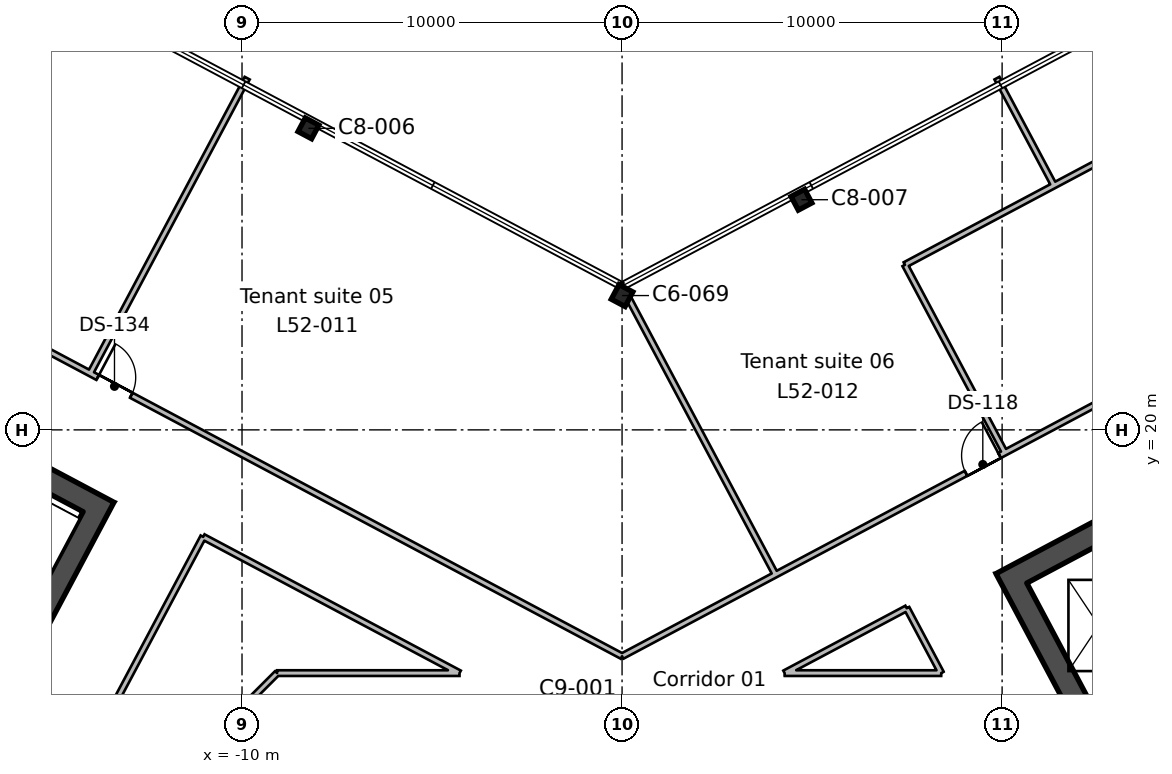
"""IFC4 building model, lengths in metres.
Left out: names, types, materials, properties, quantities, classifications, styles, units other than length and angle.
Written with IfcOpenShell. Run it as: python <this file> out.ifc"""

import sys

from ifc_helpers import new_model, si_unit, direction, frame, frame_2d, origin, origin_2d, place, context, subcontext, project, spatial, rectangle, i_section, extrude, element, fill, save


model = new_model("IFC4")
c1 = context("Model", 3, precision=1e-05, world=origin(), true_north=direction((0.0, 1.0)))
c2 = subcontext(c1, "Body", "Model", "MODEL_VIEW")
j1 = project(units=[si_unit("LENGTHUNIT", "METRE"), si_unit("PLANEANGLEUNIT", "RADIAN")], contexts=[c1])
p1 = place(None, origin())
s1 = spatial("IfcSite", under=j1, at=p1, CompositionType="ELEMENT")
p2 = place(p1, origin())
s2 = spatial("IfcBuilding", under=s1, at=p2, CompositionType="ELEMENT")
p3 = place(p2, frame((0.0, 0.0, 236.4)))
s3 = spatial("IfcBuildingStorey", under=s2, at=p3, CompositionType="ELEMENT", Elevation=236.4)
p4 = place(p3, frame((0.0, 23.534, 0.0), z_axis=(0.0, 0.0, 1.0), x_axis=(-0.882947592859, 0.469471562786, 0.0)))
e1 = element("IfcColumn", 1, at=p4, inside=s3, PredefinedType="COLUMN", context=c2, shape_type="SweptSolid", body=[
    extrude(i_section(OverallWidth=0.412, OverallDepth=0.434, WebThickness=0.036, FlangeThickness=0.057, FilletRadius=0.015, at=origin_2d()), origin(), (0.0, 0.0, 1.0), 3.9),
])
for number, where, z_axis, x_axis in (
    (2, (4.72, 26.056, 0.0), (0.0, 0.0, 1.0), (-0.883, -0.469, 0.0)),
    (3, (-8.252, 27.934, 0.0), (0.0, 0.0, 1.0), (-0.883, 0.469, 0.0)),
):
    element("IfcColumn", number, at=place(p3, frame(where, z_axis=z_axis, x_axis=x_axis)), inside=s3, PredefinedType="COLUMN", context=c2, shape_type="SweptSolid", body=[
        extrude(i_section(OverallWidth=0.404, OverallDepth=0.406, WebThickness=0.027, FlangeThickness=0.044, FilletRadius=0.015, at=origin_2d()), origin(), (0.0, 0.0, 1.0), 3.9),
    ])
p5 = place(p3, frame((-13.635, 18.236, 0.0), z_axis=(0.0, 0.0, 1.0), x_axis=(-0.469478769487, -0.88294376095, 0.0)))
e4 = element("IfcWall", 4, at=p5, inside=s3, PredefinedType="SHEAR", context=c2, shape_type="SweptSolid", body=[
    extrude(rectangle(XDim=19.4, YDim=0.6, at=frame_2d((9.7, 0.0))), origin(), (0.0, 0.0, 1.0), 3.9),
])
p6 = place(p5, frame((6.7, 0.0, 0.0)))
e5 = element("IfcOpeningElement", 5, at=p6, cuts=e4, PredefinedType="OPENING", context=c2, shape_type="SweptSolid", body=[
    extrude(rectangle(XDim=2.4, YDim=2.4, at=frame_2d((1.2, 1.2))), frame((0.0, 0.31, 0.0), z_axis=(0.0, -1.0, 0.0), x_axis=(1.0, 0.0, 0.0)), (0.0, 0.0, 1.0), 0.62),
])
p7 = place(p3, frame((-14.041, 18.112, 0.0), z_axis=(0.0, 0.0, 1.0), x_axis=(-0.882947755831, 0.46947125628, 0.0)))
e6 = element("IfcWall", 6, at=p7, inside=s3, PredefinedType="SHEAR", context=c2, shape_type="SweptSolid", body=[
    extrude(rectangle(XDim=20.2, YDim=0.6, at=frame_2d((10.1, 0.0))), origin(), (0.0, 0.0, 1.0), 3.9),
])
p8 = place(p3, frame((19.211, -0.771, 0.0), z_axis=(0.0, 0.0, 1.0), x_axis=(-0.469463742137, 0.882951751127, 0.0)))
e7 = element("IfcWall", 7, at=p8, inside=s3, PredefinedType="SHEAR", context=c2, shape_type="SweptSolid", body=[
    extrude(rectangle(XDim=19.4, YDim=0.6, at=frame_2d((9.7, 0.0))), origin(), (0.0, 0.0, 1.0), 3.9),
])
p9 = place(p8, frame((6.7, 0.0, 0.0)))
e8 = element("IfcOpeningElement", 8, at=p9, cuts=e7, PredefinedType="OPENING", context=c2, shape_type="SweptSolid", body=[
    extrude(rectangle(XDim=2.4, YDim=2.4, at=frame_2d((1.2, 1.2))), frame((0.0, 0.31, 0.0), z_axis=(0.0, -1.0, 0.0), x_axis=(1.0, 0.0, 0.0)), (0.0, 0.0, 1.0), 0.62),
])
p10 = place(p3, frame((10.509, 16.234, 0.0), z_axis=(0.0, 0.0, 1.0), x_axis=(0.88295010195, 0.469466843842, 0.0)))
e9 = element("IfcWall", 9, at=p10, inside=s3, PredefinedType="SHEAR", context=c2, shape_type="SweptSolid", body=[
    extrude(rectangle(XDim=20.2, YDim=0.6, at=frame_2d((10.1, 0.0))), origin(), (0.0, 0.0, 1.0), 3.9),
])
p11 = place(p3, frame((12.41, 12.658, 0.0), z_axis=(0.0, 0.0, 1.0), x_axis=(0.8829484765, 0.469469900894, 0.0)))
e10 = element("IfcWall", 10, at=p11, inside=s3, PredefinedType="SHEAR", context=c2, shape_type="SweptSolid", body=[
    extrude(rectangle(XDim=4.5, YDim=0.2, at=frame_2d((2.25, 0.0))), origin(), (0.0, 0.0, 1.0), 3.9),
])
p12 = place(p11, frame((0.6, 0.0, 0.0)))
e11 = element("IfcOpeningElement", 11, at=p12, cuts=e10, PredefinedType="OPENING", context=c2, shape_type="SweptSolid", body=[
    extrude(rectangle(XDim=1.1, YDim=2.1, at=frame_2d((0.55, 1.05))), frame((0.0, 0.11, 0.0), z_axis=(0.0, -1.0, 0.0), x_axis=(1.0, 0.0, 0.0)), (0.0, 0.0, 1.0), 0.22),
])
p13 = place(p3, frame((-48.541, 39.854, 0.0), z_axis=(0.0, 0.0, 1.0), x_axis=(0.882945008423, -0.469476423372, 0.0)))
e12 = element("IfcWall", 12, at=p13, inside=s3, PredefinedType="PARTITIONING", context=c2, shape_type="SweptSolid", body=[
    extrude(rectangle(XDim=54.976, YDim=0.15, at=frame_2d((27.488, 0.0))), origin(), (0.0, 0.0, 1.0), 3.54),
])
p14 = place(p13, frame((39.35, 0.0, 0.0)))
e13 = element("IfcOpeningElement", 13, at=p14, cuts=e12, PredefinedType="OPENING", context=c2, shape_type="SweptSolid", body=[
    extrude(rectangle(XDim=1.0, YDim=2.1, at=frame_2d((0.5, 1.05))), frame((0.0, 0.085, 0.0), z_axis=(0.0, -1.0, 0.0), x_axis=(1.0, 0.0, 0.0)), (0.0, 0.0, 1.0), 0.17),
])
p15 = place(p13, frame((26.55, 0.0, 0.0)))
e14 = element("IfcOpeningElement", 14, at=p15, cuts=e12, PredefinedType="OPENING", context=c2, shape_type="SweptSolid", body=[
    extrude(rectangle(XDim=1.8, YDim=2.1, at=frame_2d((0.9, 1.05))), frame((0.0, 0.085, 0.0), z_axis=(0.0, -1.0, 0.0), x_axis=(1.0, 0.0, 0.0)), (0.0, 0.0, 1.0), 0.17),
])
p16 = place(p13, frame((15.35, 0.0, 0.0)))
e15 = element("IfcOpeningElement", 15, at=p16, cuts=e12, PredefinedType="OPENING", context=c2, shape_type="SweptSolid", body=[
    extrude(rectangle(XDim=1.0, YDim=2.1, at=frame_2d((0.5, 1.05))), frame((0.0, 0.085, 0.0), z_axis=(0.0, -1.0, 0.0), x_axis=(1.0, 0.0, 0.0)), (0.0, 0.0, 1.0), 0.17),
])
p17 = place(p3, frame((0.0, 14.044, 0.0), z_axis=(0.0, 0.0, 1.0), x_axis=(0.882962129795, 0.469444221764, 0.0)))
e16 = element("IfcWall", 16, at=p17, inside=s3, PredefinedType="PARTITIONING", context=c2, shape_type="SweptSolid", body=[
    extrude(rectangle(XDim=41.607, YDim=0.15, at=frame_2d((20.803, 0.0))), origin(), (0.0, 0.0, 1.0), 3.54),
])
p18 = place(p17, frame((19.95, 0.0, 0.0)))
e17 = element("IfcOpeningElement", 17, at=p18, cuts=e16, PredefinedType="OPENING", context=c2, shape_type="SweptSolid", body=[
    extrude(rectangle(XDim=1.8, YDim=2.1, at=frame_2d((0.9, 1.05))), frame((0.0, 0.085, 0.0), z_axis=(0.0, -1.0, 0.0), x_axis=(1.0, 0.0, 0.0)), (0.0, 0.0, 1.0), 0.17),
])
p19 = place(p17, frame((10.25, 0.0, 0.0)))
e18 = element("IfcOpeningElement", 18, at=p19, cuts=e16, PredefinedType="OPENING", context=c2, shape_type="SweptSolid", body=[
    extrude(rectangle(XDim=1.0, YDim=2.1, at=frame_2d((0.5, 1.05))), frame((0.0, 0.085, 0.0), z_axis=(0.0, -1.0, 0.0), x_axis=(1.0, 0.0, 0.0)), (0.0, 0.0, 1.0), 0.17),
])
p20 = place(p3, frame((-9.864, 29.255, 0.0), z_axis=(0.0, 0.0, 1.0), x_axis=(-0.469457446168, -0.882955098653, 0.0)))
e19 = element("IfcWall", 19, at=p20, inside=s3, PredefinedType="PARTITIONING", context=c2, shape_type="SweptSolid", body=[
    extrude(rectangle(XDim=8.8, YDim=0.15, at=frame_2d((4.4, 0.0))), origin(), (0.0, 0.0, 1.0), 3.54),
])
p21 = place(p3, frame((0.183, 23.44, 0.0), z_axis=(0.0, 0.0, 1.0), x_axis=(0.469529135479, -0.882916978507, 0.0)))
e20 = element("IfcWall", 20, at=p21, inside=s3, PredefinedType="PARTITIONING", context=c2, shape_type="SweptSolid", body=[
    extrude(rectangle(XDim=8.21, YDim=0.15, at=frame_2d((4.105, 0.0))), origin(), (0.0, 0.0, 1.0), 3.54),
])
p22 = place(p3, frame((11.355, 26.424, 0.0), z_axis=(0.0, 0.0, 1.0), x_axis=(-0.882846627183, -0.469661402366, 0.0)))
e21 = element("IfcWall", 21, at=p22, inside=s3, PredefinedType="PARTITIONING", context=c2, shape_type="SweptSolid", body=[
    extrude(rectangle(XDim=4.431, YDim=0.15, at=frame_2d((2.215, 0.0))), origin(), (0.0, 0.0, 1.0), 3.54),
])
p23 = place(p3, frame((7.443, 24.343, 0.0), z_axis=(0.0, 0.0, 1.0), x_axis=(0.46941499577, -0.88297766775, 0.0)))
e22 = element("IfcWall", 22, at=p23, inside=s3, PredefinedType="PARTITIONING", context=c2, shape_type="SweptSolid", body=[
    extrude(rectangle(XDim=5.543, YDim=0.15, at=frame_2d((2.771, 0.0))), origin(), (0.0, 0.0, 1.0), 3.54),
])
p24 = place(p3, frame((9.864, 29.255, 0.0), z_axis=(0.0, 0.0, 1.0), x_axis=(0.469447181805, -0.882960556025, 0.0)))
e23 = element("IfcWall", 23, at=p24, inside=s3, PredefinedType="PARTITIONING", context=c2, shape_type="SweptSolid", body=[
    extrude(rectangle(XDim=3.199, YDim=0.15, at=frame_2d((1.6, 0.0))), origin(), (0.0, 0.0, 1.0), 3.54),
])
p25 = place(p3, frame((11.355, 26.424, 0.0), z_axis=(0.0, 0.0, 1.0), x_axis=(0.882971344108, 0.469426890458, 0.0)))
e24 = element("IfcWall", 24, at=p25, inside=s3, PredefinedType="PARTITIONING", context=c2, shape_type="SweptSolid", body=[
    extrude(rectangle(XDim=16.929, YDim=0.15, at=frame_2d((8.465, 0.0))), origin(), (0.0, 0.0, 1.0), 3.54),
])
p26 = place(p3, frame((-20.411, -0.473, 0.0), z_axis=(0.0, 0.0, 1.0), x_axis=(0.469451816494, 0.882958091865, 0.0)))
e25 = element("IfcWall", 25, at=p26, inside=s3, PredefinedType="PARTITIONING", context=c2, shape_type="SweptSolid", body=[
    extrude(rectangle(XDim=20.0, YDim=0.15, at=frame_2d((10.0, 0.0))), origin(), (0.0, 0.0, 1.0), 3.54),
])
p27 = place(p26, frame((9.45, 0.0, 0.0)))
e26 = element("IfcOpeningElement", 26, at=p27, cuts=e25, PredefinedType="OPENING", context=c2, shape_type="SweptSolid", body=[
    extrude(rectangle(XDim=1.0, YDim=2.1, at=frame_2d((0.5, 1.05))), frame((0.0, 0.085, 0.0), z_axis=(0.0, -1.0, 0.0), x_axis=(1.0, 0.0, 0.0)), (0.0, 0.0, 1.0), 0.17),
])
p28 = place(p3, frame((-11.022, 17.186, 0.0), z_axis=(0.0, 0.0, 1.0), x_axis=(0.882967947403, -0.469433279453, 0.0)))
e27 = element("IfcWall", 27, at=p28, inside=s3, PredefinedType="PARTITIONING", context=c2, shape_type="SweptSolid", body=[
    extrude(rectangle(XDim=7.639, YDim=0.15, at=frame_2d((3.819, 0.0))), origin(), (0.0, 0.0, 1.0), 3.54),
])
p29 = place(p3, frame((-4.277, 13.6, 0.0), z_axis=(0.0, 0.0, 1.0), x_axis=(-1.0, 0.0, 0.0)))
e28 = element("IfcWall", 28, at=p29, inside=s3, PredefinedType="PARTITIONING", context=c2, shape_type="SweptSolid", body=[
    extrude(rectangle(XDim=4.8, YDim=0.15, at=frame_2d((2.4, 0.0))), origin(), (0.0, 0.0, 1.0), 3.54),
])
p30 = place(p3, frame((-9.077, 13.6, 0.0), z_axis=(0.0, 0.0, 1.0), x_axis=(-0.707106781187, -0.707106781187, 0.0)))
e29 = element("IfcWall", 29, at=p30, inside=s3, PredefinedType="PARTITIONING", context=c2, shape_type="SweptSolid", body=[
    extrude(rectangle(XDim=6.397, YDim=0.15, at=frame_2d((3.198, 0.0))), origin(), (0.0, 0.0, 1.0), 3.54),
])
p31 = place(p3, frame((4.277, 13.6, 0.0), z_axis=(0.0, 0.0, 1.0), x_axis=(1.0, 0.0, 0.0)))
e30 = element("IfcWall", 30, at=p31, inside=s3, PredefinedType="PARTITIONING", context=c2, shape_type="SweptSolid", body=[
    extrude(rectangle(XDim=4.121, YDim=0.15, at=frame_2d((2.061, 0.0))), origin(), (0.0, 0.0, 1.0), 3.54),
])
p32 = place(p3, frame((8.398, 13.6, 0.0), z_axis=(0.0, 0.0, 1.0), x_axis=(-0.469388988559, 0.882991493401, 0.0)))
e31 = element("IfcWall", 31, at=p32, inside=s3, PredefinedType="PARTITIONING", context=c2, shape_type="SweptSolid", body=[
    extrude(rectangle(XDim=1.934, YDim=0.15, at=frame_2d((0.967, 0.0))), origin(), (0.0, 0.0, 1.0), 3.54),
])
p33 = place(p3, frame((7.49, 15.308, 0.0), z_axis=(0.0, 0.0, 1.0), x_axis=(-0.882983638691, -0.469403764155, 0.0)))
e32 = element("IfcWall", 32, at=p33, inside=s3, PredefinedType="PARTITIONING", context=c2, shape_type="SweptSolid", body=[
    extrude(rectangle(XDim=3.639, YDim=0.15, at=frame_2d((1.819, 0.0))), origin(), (0.0, 0.0, 1.0), 3.54),
])
p34 = place(p19, origin())
e33 = element("IfcDoor", 33, at=p34, inside=s3, OperationType="SINGLE_SWING_RIGHT", PredefinedType="DOOR", context=c2, shape_type="SweptSolid", body=[
    extrude(rectangle(XDim=1.0, YDim=2.1, at=frame_2d((0.5, 1.05))), frame((0.0, 0.025, 0.0), z_axis=(0.0, -1.0, 0.0), x_axis=(1.0, 0.0, 0.0)), (0.0, 0.0, 1.0), 0.05),
])
fill(e18, e33)
p35 = place(p14, origin())
e34 = element("IfcDoor", 34, at=p35, inside=s3, OperationType="SINGLE_SWING_LEFT", PredefinedType="DOOR", context=c2, shape_type="SweptSolid", body=[
    extrude(rectangle(XDim=1.0, YDim=2.1, at=frame_2d((0.5, 1.05))), frame((0.0, 0.025, 0.0), z_axis=(0.0, -1.0, 0.0), x_axis=(1.0, 0.0, 0.0)), (0.0, 0.0, 1.0), 0.05),
])
fill(e13, e34)
save(model, sys.argv[1])
